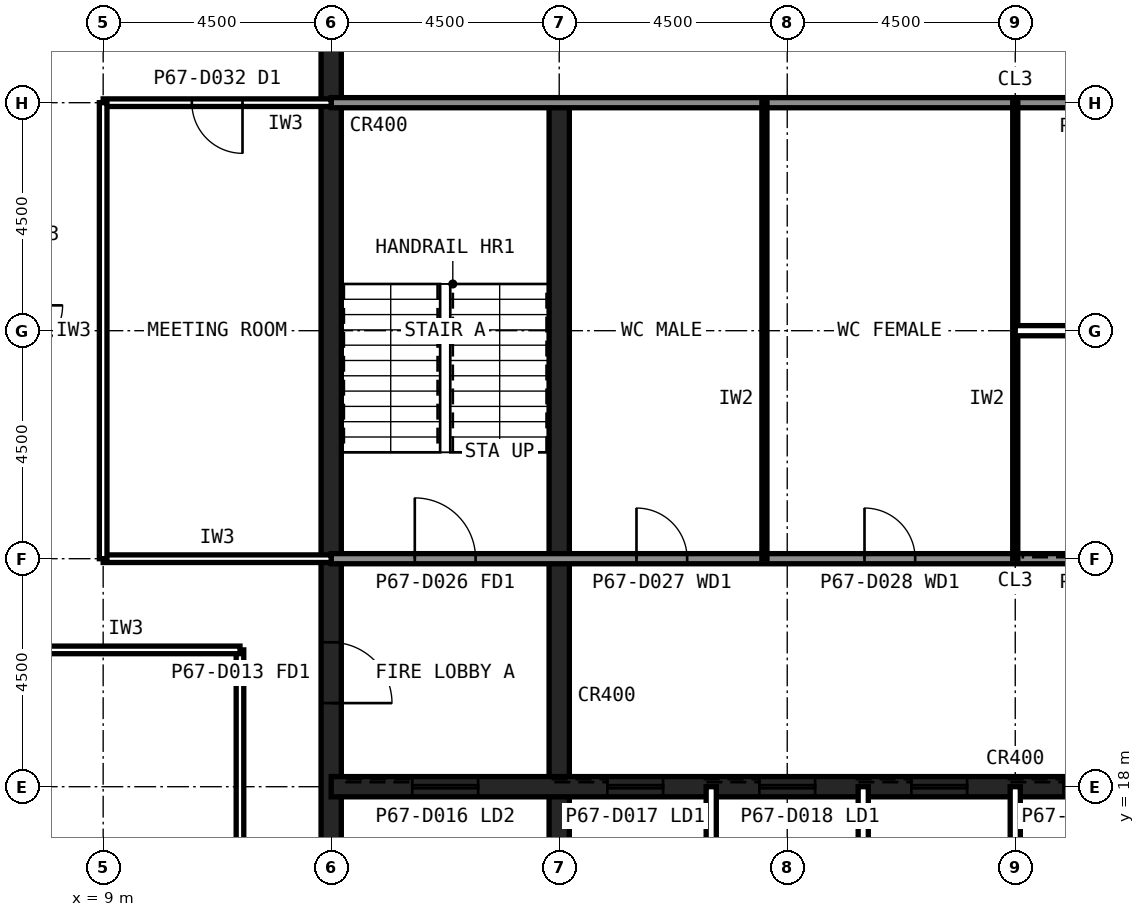
"""IFC4 building model, lengths in metres.
Left out: names, types, materials, properties, quantities, classifications, styles, units other than length and angle.
Written with IfcOpenShell. Run it as: python <this file> out.ifc"""

import sys

from ifc_helpers import new_model, si_unit, direction, frame, frame_2d, origin, place, context, subcontext, project, spatial, rectangle, extrude, element, fill, save


model = new_model("IFC4")
c1 = context("Model", 3, precision=1e-05, world=origin(), true_north=direction((0.0, 1.0)))
c2 = subcontext(c1, "Body", "Model", "MODEL_VIEW")
j1 = project(units=[si_unit("LENGTHUNIT", "METRE"), si_unit("PLANEANGLEUNIT", "RADIAN")], contexts=[c1])
p1 = place(None, origin())
s1 = spatial("IfcSite", under=j1, at=p1, CompositionType="ELEMENT")
p2 = place(p1, origin())
s2 = spatial("IfcBuilding", under=s1, at=p2, CompositionType="ELEMENT")
p3 = place(p2, frame((0.0, 0.0, 278.6)))
s3 = spatial("IfcBuildingStorey", under=s2, at=p3, CompositionType="ELEMENT", Elevation=278.6)
p4 = place(p3, frame((13.5, 40.5, 0.0), z_axis=(0.0, 0.0, 1.0), x_axis=(0.0, -1.0, 0.0)))
e1 = element("IfcWall", 1, at=p4, inside=s3, PredefinedType="SHEAR", context=c2, shape_type="SweptSolid", body=[
    extrude(rectangle(XDim=27.0, YDim=0.4, at=frame_2d((13.5, 0.0))), origin(), (0.0, 0.0, 1.0), 4.0),
])
p5 = place(p4, frame((19.65, 0.0, 0.0)))
e2 = element("IfcOpeningElement", 2, at=p5, cuts=e1, PredefinedType="OPENING", context=c2, shape_type="SweptSolid", body=[
    extrude(rectangle(XDim=1.2, YDim=2.1, at=frame_2d((0.6, 1.05))), frame((0.0, 0.21, 0.0), z_axis=(0.0, -1.0, 0.0), x_axis=(1.0, 0.0, 0.0)), (0.0, 0.0, 1.0), 0.42),
])
p6 = place(p4, frame((5.85, 0.0, 0.0)))
e3 = element("IfcOpeningElement", 3, at=p6, cuts=e1, PredefinedType="OPENING", context=c2, shape_type="SweptSolid", body=[
    extrude(rectangle(XDim=1.8, YDim=2.1, at=frame_2d((0.9, 1.05))), frame((0.0, 0.21, 0.0), z_axis=(0.0, -1.0, 0.0), x_axis=(1.0, 0.0, 0.0)), (0.0, 0.0, 1.0), 0.42),
])
p7 = place(p3, frame((18.0, 13.5, 0.0), z_axis=(0.0, 0.0, 1.0), x_axis=(0.0, 1.0, 0.0)))
e4 = element("IfcWall", 4, at=p7, inside=s3, PredefinedType="SHEAR", context=c2, shape_type="SweptSolid", body=[
    extrude(rectangle(XDim=18.0, YDim=0.4, at=frame_2d((9.0, 0.0))), origin(), (0.0, 0.0, 1.0), 4.0),
])
p8 = place(p3, frame((13.5, 18.0, 0.0), z_axis=(0.0, 0.0, 1.0), x_axis=(1.0, 0.0, 0.0)))
e5 = element("IfcWall", 5, at=p8, inside=s3, PredefinedType="SHEAR", context=c2, shape_type="SweptSolid", body=[
    extrude(rectangle(XDim=27.0, YDim=0.4, at=frame_2d((13.5, 0.0))), origin(), (0.0, 0.0, 1.0), 4.0),
])
p9 = place(p8, frame((24.3, 0.0, 0.0)))
e6 = element("IfcOpeningElement", 6, at=p9, cuts=e5, PredefinedType="OPENING", context=c2, shape_type="SweptSolid", body=[
    extrude(rectangle(XDim=0.9, YDim=2.1, at=frame_2d((0.45, 1.05))), frame((0.0, 0.21, 0.0), z_axis=(0.0, -1.0, 0.0), x_axis=(1.0, 0.0, 0.0)), (0.0, 0.0, 1.0), 0.42),
])
p10 = place(p8, frame((5.45, 0.0, 0.0)))
e7 = element("IfcOpeningElement", 7, at=p10, cuts=e5, PredefinedType="OPENING", context=c2, shape_type="SweptSolid", body=[
    extrude(rectangle(XDim=1.1, YDim=2.1, at=frame_2d((0.55, 1.05))), frame((0.0, 0.21, 0.0), z_axis=(0.0, -1.0, 0.0), x_axis=(1.0, 0.0, 0.0)), (0.0, 0.0, 1.0), 0.42),
])
p11 = place(p8, frame((8.45, 0.0, 0.0)))
e8 = element("IfcOpeningElement", 8, at=p11, cuts=e5, PredefinedType="OPENING", context=c2, shape_type="SweptSolid", body=[
    extrude(rectangle(XDim=1.1, YDim=2.1, at=frame_2d((0.55, 1.05))), frame((0.0, 0.21, 0.0), z_axis=(0.0, -1.0, 0.0), x_axis=(1.0, 0.0, 0.0)), (0.0, 0.0, 1.0), 0.42),
])
p12 = place(p8, frame((11.45, 0.0, 0.0)))
e9 = element("IfcOpeningElement", 9, at=p12, cuts=e5, PredefinedType="OPENING", context=c2, shape_type="SweptSolid", body=[
    extrude(rectangle(XDim=1.1, YDim=2.1, at=frame_2d((0.55, 1.05))), frame((0.0, 0.21, 0.0), z_axis=(0.0, -1.0, 0.0), x_axis=(1.0, 0.0, 0.0)), (0.0, 0.0, 1.0), 0.42),
])
p13 = place(p8, frame((14.45, 0.0, 0.0)))
e10 = element("IfcOpeningElement", 10, at=p13, cuts=e5, PredefinedType="OPENING", context=c2, shape_type="SweptSolid", body=[
    extrude(rectangle(XDim=1.1, YDim=2.1, at=frame_2d((0.55, 1.05))), frame((0.0, 0.21, 0.0), z_axis=(0.0, -1.0, 0.0), x_axis=(1.0, 0.0, 0.0)), (0.0, 0.0, 1.0), 0.42),
])
p14 = place(p8, frame((17.45, 0.0, 0.0)))
e11 = element("IfcOpeningElement", 11, at=p14, cuts=e5, PredefinedType="OPENING", context=c2, shape_type="SweptSolid", body=[
    extrude(rectangle(XDim=1.1, YDim=2.1, at=frame_2d((0.55, 1.05))), frame((0.0, 0.21, 0.0), z_axis=(0.0, -1.0, 0.0), x_axis=(1.0, 0.0, 0.0)), (0.0, 0.0, 1.0), 0.42),
])
p15 = place(p8, frame((20.45, 0.0, 0.0)))
e12 = element("IfcOpeningElement", 12, at=p15, cuts=e5, PredefinedType="OPENING", context=c2, shape_type="SweptSolid", body=[
    extrude(rectangle(XDim=1.1, YDim=2.1, at=frame_2d((0.55, 1.05))), frame((0.0, 0.21, 0.0), z_axis=(0.0, -1.0, 0.0), x_axis=(1.0, 0.0, 0.0)), (0.0, 0.0, 1.0), 0.42),
])
p16 = place(p8, frame((1.6, 0.0, 0.0)))
e13 = element("IfcOpeningElement", 13, at=p16, cuts=e5, PredefinedType="OPENING", context=c2, shape_type="SweptSolid", body=[
    extrude(rectangle(XDim=1.3, YDim=2.2, at=frame_2d((0.65, 1.1))), frame((0.0, 0.21, 0.0), z_axis=(0.0, -1.0, 0.0), x_axis=(1.0, 0.0, 0.0)), (0.0, 0.0, 1.0), 0.42),
])
p17 = place(p3, frame((13.5, 22.5, 0.0), z_axis=(0.0, 0.0, 1.0), x_axis=(1.0, 0.0, 0.0)))
e14 = element("IfcWall", 14, at=p17, inside=s3, PredefinedType="SOLIDWALL", context=c2, shape_type="SweptSolid", body=[
    extrude(rectangle(XDim=27.0, YDim=0.2, at=frame_2d((13.5, 0.0))), origin(), (0.0, 0.0, 1.0), 3.84),
])
p18 = place(p17, frame((1.65, 0.0, 0.0)))
e15 = element("IfcOpeningElement", 15, at=p18, cuts=e14, PredefinedType="OPENING", context=c2, shape_type="SweptSolid", body=[
    extrude(rectangle(XDim=1.2, YDim=2.1, at=frame_2d((0.6, 1.05))), frame((0.0, 0.11, 0.0), z_axis=(0.0, -1.0, 0.0), x_axis=(1.0, 0.0, 0.0)), (0.0, 0.0, 1.0), 0.22),
])
p19 = place(p17, frame((6.025, 0.0, 0.0)))
e16 = element("IfcOpeningElement", 16, at=p19, cuts=e14, PredefinedType="OPENING", context=c2, shape_type="SweptSolid", body=[
    extrude(rectangle(XDim=1.0, YDim=2.1, at=frame_2d((0.5, 1.05))), frame((0.0, 0.11, 0.0), z_axis=(0.0, -1.0, 0.0), x_axis=(1.0, 0.0, 0.0)), (0.0, 0.0, 1.0), 0.22),
])
p20 = place(p17, frame((10.525, 0.0, 0.0)))
e17 = element("IfcOpeningElement", 17, at=p20, cuts=e14, PredefinedType="OPENING", context=c2, shape_type="SweptSolid", body=[
    extrude(rectangle(XDim=1.0, YDim=2.1, at=frame_2d((0.5, 1.05))), frame((0.0, 0.11, 0.0), z_axis=(0.0, -1.0, 0.0), x_axis=(1.0, 0.0, 0.0)), (0.0, 0.0, 1.0), 0.22),
])
p21 = place(p17, frame((19.75, 0.0, 0.0)))
e18 = element("IfcOpeningElement", 18, at=p21, cuts=e14, PredefinedType="OPENING", context=c2, shape_type="SweptSolid", body=[
    extrude(rectangle(XDim=1.0, YDim=2.1, at=frame_2d((0.5, 1.05))), frame((0.0, 0.11, 0.0), z_axis=(0.0, -1.0, 0.0), x_axis=(1.0, 0.0, 0.0)), (0.0, 0.0, 1.0), 0.22),
])
p22 = place(p17, frame((15.05, 0.0, 0.0)))
e19 = element("IfcOpeningElement", 19, at=p22, cuts=e14, PredefinedType="OPENING", context=c2, shape_type="SweptSolid", body=[
    extrude(rectangle(XDim=1.4, YDim=2.4, at=frame_2d((0.7, 1.2))), frame((0.0, 0.11, 0.0), z_axis=(0.0, -1.0, 0.0), x_axis=(1.0, 0.0, 0.0)), (0.0, 0.0, 1.0), 0.22),
])
p23 = place(p3, frame((13.5, 31.5, 0.0), z_axis=(0.0, 0.0, 1.0), x_axis=(1.0, 0.0, 0.0)))
e20 = element("IfcWall", 20, at=p23, inside=s3, PredefinedType="SOLIDWALL", context=c2, shape_type="SweptSolid", body=[
    extrude(rectangle(XDim=27.0, YDim=0.2, at=frame_2d((13.5, 0.0))), origin(), (0.0, 0.0, 1.0), 3.84),
])
p24 = place(p23, frame((24.15, 0.0, 0.0)))
e21 = element("IfcOpeningElement", 21, at=p24, cuts=e20, PredefinedType="OPENING", context=c2, shape_type="SweptSolid", body=[
    extrude(rectangle(XDim=1.2, YDim=2.1, at=frame_2d((0.6, 1.05))), frame((0.0, 0.11, 0.0), z_axis=(0.0, -1.0, 0.0), x_axis=(1.0, 0.0, 0.0)), (0.0, 0.0, 1.0), 0.22),
])
p25 = place(p23, frame((15.3, 0.0, 0.0)))
e22 = element("IfcOpeningElement", 22, at=p25, cuts=e20, PredefinedType="OPENING", context=c2, shape_type="SweptSolid", body=[
    extrude(rectangle(XDim=0.9, YDim=2.1, at=frame_2d((0.45, 1.05))), frame((0.0, 0.11, 0.0), z_axis=(0.0, -1.0, 0.0), x_axis=(1.0, 0.0, 0.0)), (0.0, 0.0, 1.0), 0.22),
])
p26 = place(p23, frame((19.8, 0.0, 0.0)))
e23 = element("IfcOpeningElement", 23, at=p26, cuts=e20, PredefinedType="OPENING", context=c2, shape_type="SweptSolid", body=[
    extrude(rectangle(XDim=0.9, YDim=2.1, at=frame_2d((0.45, 1.05))), frame((0.0, 0.11, 0.0), z_axis=(0.0, -1.0, 0.0), x_axis=(1.0, 0.0, 0.0)), (0.0, 0.0, 1.0), 0.22),
])
for number, where, z_axis, x_axis in (
    (24, (21.0, 13.5, 0.0), (0.0, 0.0, 1.0), (0.0, 1.0, 0.0)),
    (25, (24.0, 13.5, 0.0), (0.0, 0.0, 1.0), (0.0, 1.0, 0.0)),
    (26, (27.0, 13.5, 0.0), (0.0, 0.0, 1.0), (0.0, 1.0, 0.0)),
):
    element("IfcWall", number, at=place(p3, frame(where, z_axis=z_axis, x_axis=x_axis)), inside=s3, PredefinedType="PARTITIONING", context=c2, shape_type="SweptSolid", body=[
        extrude(rectangle(XDim=4.5, YDim=0.2, at=frame_2d((2.25, 0.0))), origin(), (0.0, 0.0, 1.0), 3.84),
    ])
for number, where, z_axis, x_axis in (
    (27, (22.05, 22.5, 0.0), (0.0, 0.0, 1.0), (0.0, 1.0, 0.0)),
    (28, (27.0, 22.5, 0.0), (0.0, 0.0, 1.0), (0.0, 1.0, 0.0)),
):
    element("IfcWall", number, at=place(p3, frame(where, z_axis=z_axis, x_axis=x_axis)), inside=s3, PredefinedType="PLUMBINGWALL", context=c2, shape_type="SweptSolid", body=[
        extrude(rectangle(XDim=9.0, YDim=0.1, at=frame_2d((4.5, 0.0))), origin(), (0.0, 0.0, 1.0), 3.84),
    ])
p27 = place(p3, frame((27.0, 27.0, 0.0), z_axis=(0.0, 0.0, 1.0), x_axis=(1.0, 0.0, 0.0)))
e29 = element("IfcWall", 29, at=p27, inside=s3, PredefinedType="PARTITIONING", context=c2, shape_type="SweptSolid", body=[
    extrude(rectangle(XDim=9.0, YDim=0.2, at=frame_2d((4.5, 0.0))), origin(), (0.0, 0.0, 1.0), 3.84),
])
p28 = place(p3, frame((11.7, 20.7, 0.0), z_axis=(0.0, 0.0, 1.0), x_axis=(0.0, -1.0, 0.0)))
e30 = element("IfcWall", 30, at=p28, inside=s3, PredefinedType="PARTITIONING", context=c2, shape_type="SweptSolid", body=[
    extrude(rectangle(XDim=9.0, YDim=0.15, at=frame_2d((4.5, 0.0))), origin(), (0.0, 0.0, 1.0), 3.84),
])
p29 = place(p3, frame((7.2, 20.7, 0.0), z_axis=(0.0, 0.0, 1.0), x_axis=(1.0, 0.0, 0.0)))
e31 = element("IfcWall", 31, at=p29, inside=s3, PredefinedType="PARTITIONING", context=c2, shape_type="SweptSolid", body=[
    extrude(rectangle(XDim=4.5, YDim=0.15, at=frame_2d((2.25, 0.0))), origin(), (0.0, 0.0, 1.0), 3.84),
])
p30 = place(p3, frame((9.0, 22.5, 0.0), z_axis=(0.0, 0.0, 1.0), x_axis=(1.0, 0.0, 0.0)))
e32 = element("IfcWall", 32, at=p30, inside=s3, PredefinedType="PARTITIONING", context=c2, shape_type="SweptSolid", body=[
    extrude(rectangle(XDim=4.5, YDim=0.15, at=frame_2d((2.25, 0.0))), origin(), (0.0, 0.0, 1.0), 2.989),
])
p31 = place(p3, frame((13.5, 31.5, 0.0), z_axis=(0.0, 0.0, 1.0), x_axis=(-1.0, 0.0, 0.0)))
e33 = element("IfcWall", 33, at=p31, inside=s3, PredefinedType="PARTITIONING", context=c2, shape_type="SweptSolid", body=[
    extrude(rectangle(XDim=4.5, YDim=0.15, at=frame_2d((2.25, 0.0))), origin(), (0.0, 0.0, 1.0), 2.989),
])
p32 = place(p31, frame((1.75, 0.0, 0.0)))
e34 = element("IfcOpeningElement", 34, at=p32, cuts=e33, PredefinedType="OPENING", context=c2, shape_type="SweptSolid", body=[
    extrude(rectangle(XDim=1.0, YDim=2.1, at=frame_2d((0.5, 1.05))), frame((0.0, 0.085, 0.0), z_axis=(0.0, -1.0, 0.0), x_axis=(1.0, 0.0, 0.0)), (0.0, 0.0, 1.0), 0.17),
])
p33 = place(p3, frame((9.0, 31.5, 0.0), z_axis=(0.0, 0.0, 1.0), x_axis=(0.0, -1.0, 0.0)))
e35 = element("IfcWall", 35, at=p33, inside=s3, PredefinedType="PARTITIONING", context=c2, shape_type="SweptSolid", body=[
    extrude(rectangle(XDim=9.0, YDim=0.15, at=frame_2d((4.5, 0.0))), origin(), (0.0, 0.0, 1.0), 3.84),
])
p34 = place(p5, origin())
e36 = element("IfcDoor", 36, at=p34, inside=s3, OperationType="SINGLE_SWING_RIGHT", PredefinedType="DOOR", context=c2, shape_type="SweptSolid", body=[
    extrude(rectangle(XDim=1.2, YDim=2.1, at=frame_2d((0.6, 1.05))), frame((0.0, 0.025, 0.0), z_axis=(0.0, -1.0, 0.0), x_axis=(1.0, 0.0, 0.0)), (0.0, 0.0, 1.0), 0.05),
])
fill(e2, e36)
p35 = place(p18, origin())
e37 = element("IfcDoor", 37, at=p35, inside=s3, OperationType="SINGLE_SWING_LEFT", PredefinedType="DOOR", context=c2, shape_type="SweptSolid", body=[
    extrude(rectangle(XDim=1.2, YDim=2.1, at=frame_2d((0.6, 1.05))), frame((0.0, 0.025, 0.0), z_axis=(0.0, -1.0, 0.0), x_axis=(1.0, 0.0, 0.0)), (0.0, 0.0, 1.0), 0.05),
])
fill(e15, e37)
p36 = place(p19, origin())
e38 = element("IfcDoor", 38, at=p36, inside=s3, OperationType="SINGLE_SWING_LEFT", PredefinedType="DOOR", context=c2, shape_type="SweptSolid", body=[
    extrude(rectangle(XDim=1.0, YDim=2.1, at=frame_2d((0.5, 1.05))), frame((0.0, 0.025, 0.0), z_axis=(0.0, -1.0, 0.0), x_axis=(1.0, 0.0, 0.0)), (0.0, 0.0, 1.0), 0.05),
])
fill(e16, e38)
p37 = place(p20, origin())
e39 = element("IfcDoor", 39, at=p37, inside=s3, OperationType="SINGLE_SWING_LEFT", PredefinedType="DOOR", context=c2, shape_type="SweptSolid", body=[
    extrude(rectangle(XDim=1.0, YDim=2.1, at=frame_2d((0.5, 1.05))), frame((0.0, 0.025, 0.0), z_axis=(0.0, -1.0, 0.0), x_axis=(1.0, 0.0, 0.0)), (0.0, 0.0, 1.0), 0.05),
])
fill(e17, e39)
p38 = place(p10, origin())
e40 = element("IfcDoor", 40, at=p38, inside=s3, OperationType="SLIDING_TO_LEFT", PredefinedType="DOOR", context=c2, shape_type="SweptSolid", body=[
    extrude(rectangle(XDim=1.1, YDim=2.1, at=frame_2d((0.55, 1.05))), frame((0.0, 0.025, 0.0), z_axis=(0.0, -1.0, 0.0), x_axis=(1.0, 0.0, 0.0)), (0.0, 0.0, 1.0), 0.05),
])
fill(e7, e40)
p39 = place(p11, origin())
e41 = element("IfcDoor", 41, at=p39, inside=s3, OperationType="SLIDING_TO_LEFT", PredefinedType="DOOR", context=c2, shape_type="SweptSolid", body=[
    extrude(rectangle(XDim=1.1, YDim=2.1, at=frame_2d((0.55, 1.05))), frame((0.0, 0.025, 0.0), z_axis=(0.0, -1.0, 0.0), x_axis=(1.0, 0.0, 0.0)), (0.0, 0.0, 1.0), 0.05),
])
fill(e8, e41)
p40 = place(p12, origin())
e42 = element("IfcDoor", 42, at=p40, inside=s3, OperationType="SLIDING_TO_LEFT", PredefinedType="DOOR", context=c2, shape_type="SweptSolid", body=[
    extrude(rectangle(XDim=1.1, YDim=2.1, at=frame_2d((0.55, 1.05))), frame((0.0, 0.025, 0.0), z_axis=(0.0, -1.0, 0.0), x_axis=(1.0, 0.0, 0.0)), (0.0, 0.0, 1.0), 0.05),
])
fill(e9, e42)
p41 = place(p13, origin())
e43 = element("IfcDoor", 43, at=p41, inside=s3, OperationType="SLIDING_TO_LEFT", PredefinedType="DOOR", context=c2, shape_type="SweptSolid", body=[
    extrude(rectangle(XDim=1.1, YDim=2.1, at=frame_2d((0.55, 1.05))), frame((0.0, 0.025, 0.0), z_axis=(0.0, -1.0, 0.0), x_axis=(1.0, 0.0, 0.0)), (0.0, 0.0, 1.0), 0.05),
])
fill(e10, e43)
p42 = place(p16, origin())
e44 = element("IfcDoor", 44, at=p42, inside=s3, OperationType="SLIDING_TO_LEFT", PredefinedType="DOOR", context=c2, shape_type="SweptSolid", body=[
    extrude(rectangle(XDim=1.3, YDim=2.2, at=frame_2d((0.65, 1.1))), frame((0.0, 0.025, 0.0), z_axis=(0.0, -1.0, 0.0), x_axis=(1.0, 0.0, 0.0)), (0.0, 0.0, 1.0), 0.05),
])
fill(e13, e44)
p43 = place(p32, origin())
e45 = element("IfcDoor", 45, at=p43, inside=s3, OperationType="SINGLE_SWING_LEFT", PredefinedType="DOOR", context=c2, shape_type="SweptSolid", body=[
    extrude(rectangle(XDim=1.0, YDim=2.1, at=frame_2d((0.5, 1.05))), frame((0.0, 0.025, 0.0), z_axis=(0.0, -1.0, 0.0), x_axis=(1.0, 0.0, 0.0)), (0.0, 0.0, 1.0), 0.05),
])
fill(e34, e45)
save(model, sys.argv[1])
